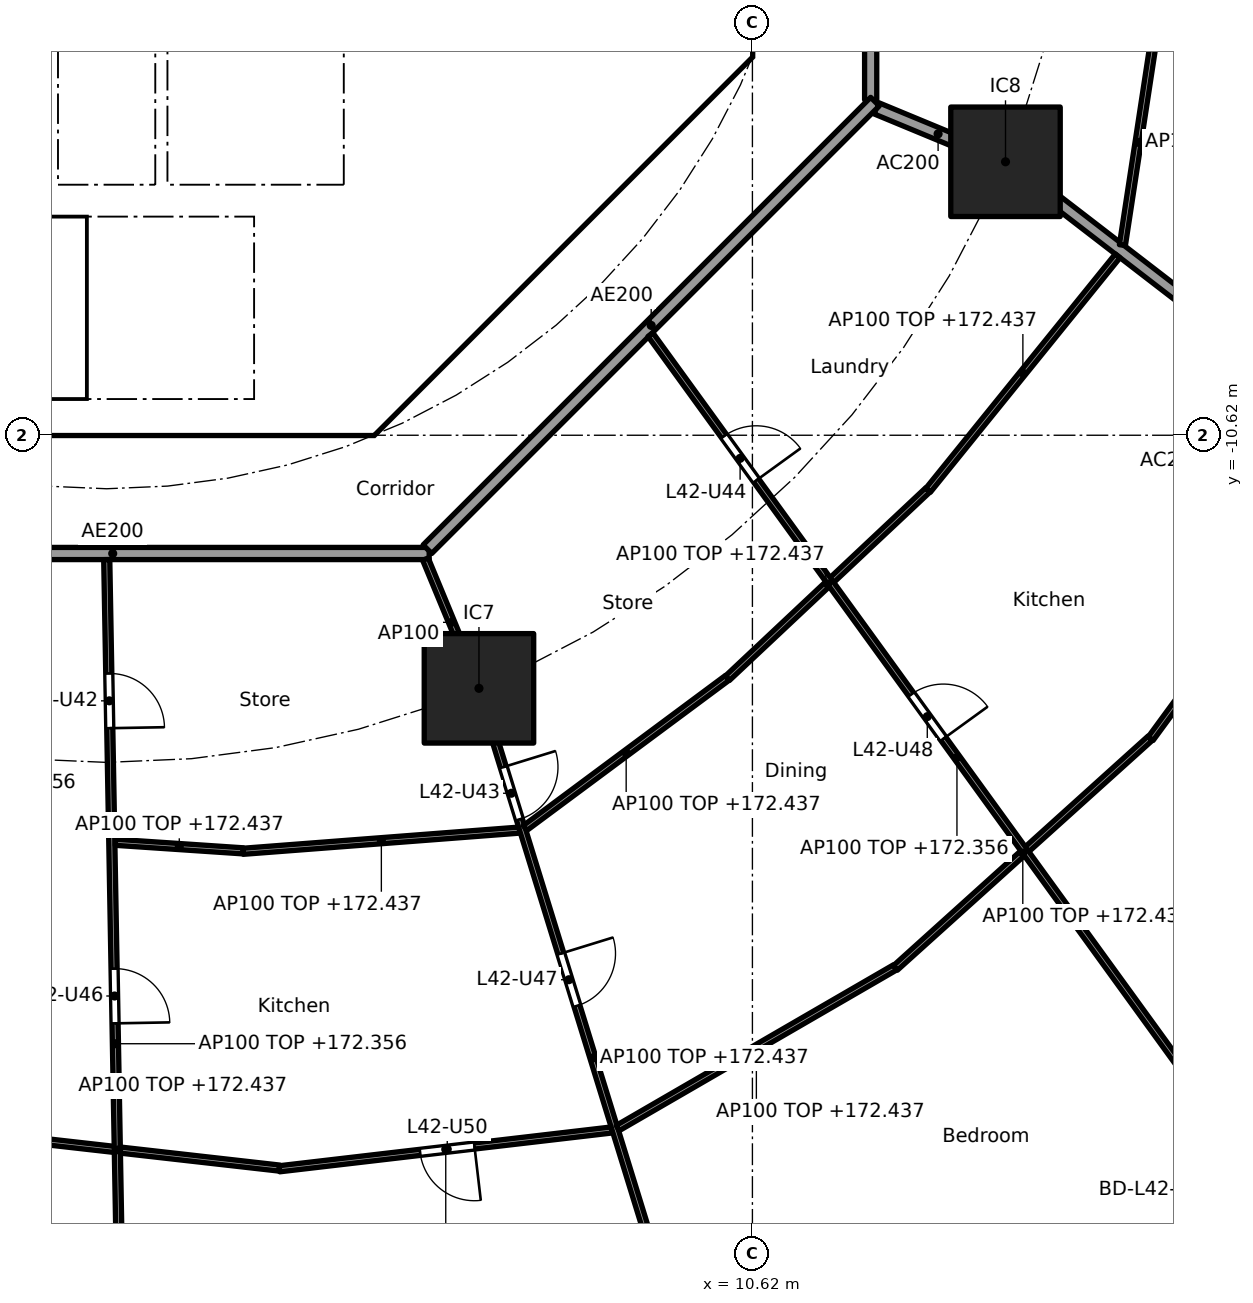
"""IFC4 building model, lengths in metres.
Left out: names, types, materials, properties, quantities, classifications, styles, units other than length and angle.
Written with IfcOpenShell. Run it as: python <this file> out.ifc"""

import sys

from ifc_helpers import new_model, si_unit, direction, frame, frame_2d, origin, origin_2d, place, context, subcontext, project, spatial, polyline, rectangle, outline, extrude, element, fill, save


model = new_model("IFC4")
c1 = context("Model", 3, precision=1e-05, world=origin(), true_north=direction((0.0, 1.0)))
c2 = subcontext(c1, "Body", "Model", "MODEL_VIEW")
j1 = project(units=[si_unit("LENGTHUNIT", "METRE"), si_unit("PLANEANGLEUNIT", "RADIAN")], contexts=[c1])
p1 = place(None, origin())
s1 = spatial("IfcSite", under=j1, at=p1, CompositionType="ELEMENT")
p2 = place(p1, origin())
s2 = spatial("IfcBuilding", under=s1, at=p2, CompositionType="ELEMENT")
p3 = place(p2, frame((0.0, 0.0, 169.6)))
s3 = spatial("IfcBuildingStorey", under=s2, at=p3, CompositionType="ELEMENT", Elevation=169.6)
for number, where, z_axis, x_axis in (
    (1, (6.123, -14.782, 0.0), (0.0, 0.0, 1.0), (1.0, 0.0, 0.0)),
    (2, (14.782, -6.123, 0.0), (0.0, 0.0, 1.0), (1.0, 0.0, 0.0)),
):
    element("IfcColumn", number, at=place(p3, frame(where, z_axis=z_axis, x_axis=x_axis)), inside=s3, PredefinedType="COLUMN", context=c2, shape_type="SweptSolid", body=[
        extrude(rectangle(XDim=1.8, YDim=1.8, at=origin_2d()), origin(), (0.0, 0.0, 1.0), 3.7),
    ])
p4 = place(p3, frame((18.972, -22.809, 0.0), z_axis=(0.0, 0.0, 1.0), x_axis=(-0.796055733703, -0.60522332146, 0.0)))
e3 = element("IfcWall", 3, at=p4, inside=s3, PredefinedType="SOLIDWALL", context=c2, shape_type="SweptSolid", body=[
    extrude(rectangle(XDim=2.917, YDim=0.25, at=frame_2d((1.458, 0.0))), origin(), (0.0, 0.0, 1.0), 3.44),
])
p5 = place(p4, frame((0.408, 0.0, 0.0)))
e4 = element("IfcOpeningElement", 4, at=p5, cuts=e3, PredefinedType="OPENING", context=c2, shape_type="SweptSolid", body=[
    extrude(rectangle(XDim=2.1, YDim=2.4, at=frame_2d((1.05, 1.2))), frame((0.0, 0.135, 0.0), z_axis=(0.0, -1.0, 0.0), x_axis=(1.0, 0.0, 0.0)), (0.0, 0.0, 1.0), 0.27),
])
p6 = place(p3, frame((4.613, -9.988, 0.0), z_axis=(0.0, 0.0, 1.0), x_axis=(0.707106781187, 0.707106781187, 0.0)))
e5 = element("IfcWall", 5, at=p6, inside=s3, PredefinedType="SHEAR", context=c2, shape_type="SweptSolid", body=[
    extrude(rectangle(XDim=7.602, YDim=0.6, at=frame_2d((3.801, 0.0))), origin(), (0.0, 0.0, 1.0), 3.44),
])
p7 = place(p6, frame((3.201, 0.0, 0.0)))
e6 = element("IfcOpeningElement", 6, at=p7, cuts=e5, PredefinedType="OPENING", context=c2, shape_type="SweptSolid", body=[
    extrude(rectangle(XDim=1.2, YDim=2.1, at=frame_2d((0.6, 1.05))), frame((0.0, 0.31, 0.0), z_axis=(0.0, -1.0, 0.0), x_axis=(1.0, 0.0, 0.0)), (0.0, 0.0, 1.0), 0.62),
])
p8 = place(p3, frame((4.0, -10.025, 0.0), z_axis=(0.0, 0.0, 1.0), x_axis=(0.0, 1.0, 0.0)))
e7 = element("IfcWall", 7, at=p8, inside=s3, PredefinedType="SOLIDWALL", context=c2, shape_type="SweptSolid", body=[
    extrude(rectangle(XDim=3.0, YDim=0.2, at=frame_2d((1.5, 0.0))), origin(), (0.0, 0.0, 1.0), 3.44),
])
p9 = place(p8, frame((0.975, 0.0, 0.0)))
e8 = element("IfcOpeningElement", 8, at=p9, cuts=e7, PredefinedType="OPENING", context=c2, shape_type="SweptSolid", body=[
    extrude(rectangle(XDim=1.1, YDim=2.1, at=frame_2d((0.55, 1.05))), frame((0.0, 0.11, 0.0), z_axis=(0.0, -1.0, 0.0), x_axis=(1.0, 0.0, 0.0)), (0.0, 0.0, 1.0), 0.22),
])
p10 = place(p3, frame((4.0, -6.5, 0.0), z_axis=(0.0, 0.0, 1.0), x_axis=(0.0, 1.0, 0.0)))
e9 = element("IfcWall", 9, at=p10, inside=s3, PredefinedType="SOLIDWALL", context=c2, shape_type="SweptSolid", body=[
    extrude(rectangle(XDim=2.2, YDim=0.2, at=frame_2d((1.1, 0.0))), origin(), (0.0, 0.0, 1.0), 3.44),
])
p11 = place(p10, frame((0.55, 0.0, 0.0)))
e10 = element("IfcOpeningElement", 10, at=p11, cuts=e9, PredefinedType="OPENING", context=c2, shape_type="SweptSolid", body=[
    extrude(rectangle(XDim=1.1, YDim=2.1, at=frame_2d((0.55, 1.05))), frame((0.0, 0.11, 0.0), z_axis=(0.0, -1.0, 0.0), x_axis=(1.0, 0.0, 0.0)), (0.0, 0.0, 1.0), 0.22),
])
p12 = place(p3, origin())
e11 = element("IfcWall", 11, at=p12, inside=s3, PredefinedType="SHEAR", context=c2, shape_type="SweptSolid", body=[
    extrude(outline(polyline([(-4.152, -10.025), (4.152, -10.025), (4.401, -9.776), (4.825, -10.2), (4.401, -10.625), (-4.401, -10.625), (-4.825, -10.2), (-4.401, -9.776), (-4.152, -10.025)])), origin(), (0.0, 0.0, 1.0), 3.44),
])
p13 = place(p3, origin())
e12 = element("IfcWall", 12, at=p13, inside=s3, PredefinedType="SHEAR", context=c2, shape_type="SweptSolid", body=[
    extrude(outline(polyline([(9.776, -4.401), (10.025, -4.152), (10.025, -3.801), (10.025, 4.152), (9.776, 4.401), (10.2, 4.825), (10.625, 4.401), (10.625, -4.401), (10.2, -4.825), (9.776, -4.401)])), origin(), (0.0, 0.0, 1.0), 3.44),
])
for number, where, z_axis, x_axis in (
    (13, (-0.9, -6.5, 0.0), (0.0, 0.0, 1.0), (0.0, 1.0, 0.0)),
    (14, (0.9, -6.5, 0.0), (0.0, 0.0, 1.0), (0.0, 1.0, 0.0)),
):
    element("IfcWall", number, at=place(p3, frame(where, z_axis=z_axis, x_axis=x_axis)), inside=s3, PredefinedType="SOLIDWALL", context=c2, shape_type="SweptSolid", body=[
        extrude(rectangle(XDim=2.2, YDim=0.2, at=frame_2d((1.1, 0.0))), origin(), (0.0, 0.0, 1.0), 3.44),
    ])
p14 = place(p3, origin())
e15 = element("IfcWall", 15, at=p14, inside=s3, PredefinedType="SOLIDWALL", context=c2, shape_type="SweptSolid", body=[
    extrude(outline(polyline([(4.1, -7.025), (-4.1, -7.025), (-4.1, -6.5), (4.1, -6.5), (4.1, -7.025)])), origin(), (0.0, 0.0, 1.0), 3.44),
])
p15 = place(p3, frame((12.657, -5.243, 0.0), z_axis=(0.0, 0.0, 1.0), x_axis=(0.92383017907, -0.382802560388, 0.0)))
e16 = element("IfcWall", 16, at=p15, inside=s3, PredefinedType="PARTITIONING", context=c2, shape_type="SweptSolid", body=[
    extrude(rectangle(XDim=2.2, YDim=0.2, at=frame_2d((1.1, 0.0))), origin(), (0.0, 0.0, 1.0), 3.44),
])
p16 = place(p3, frame((14.822, -6.154, 0.0), z_axis=(0.0, 0.0, 1.0), x_axis=(0.792203056092, -0.610257583254, 0.0)))
e17 = element("IfcWall", 17, at=p16, inside=s3, PredefinedType="PARTITIONING", context=c2, shape_type="SweptSolid", body=[
    extrude(rectangle(XDim=12.533, YDim=0.2, at=frame_2d((6.266, 0.0))), origin(), (0.0, 0.0, 1.0), 2.837),
])
p17 = place(p3, frame((12.565, -5.104, 0.0), z_axis=(0.0, 0.0, 1.0), x_axis=(0.0, 1.0, 0.0)))
e18 = element("IfcWall", 18, at=p17, inside=s3, PredefinedType="PARTITIONING", context=c2, shape_type="SweptSolid", body=[
    extrude(rectangle(XDim=10.209, YDim=0.2, at=frame_2d((5.104, 0.0))), origin(), (0.0, 0.0, 1.0), 3.44),
])
p18 = place(p17, frame((5.906, 0.0, 0.0)))
e19 = element("IfcOpeningElement", 19, at=p18, cuts=e18, PredefinedType="OPENING", context=c2, shape_type="SweptSolid", body=[
    extrude(rectangle(XDim=1.0, YDim=2.1, at=frame_2d((0.5, 1.05))), frame((0.0, 0.11, 0.0), z_axis=(0.0, -1.0, 0.0), x_axis=(1.0, 0.0, 0.0)), (0.0, 0.0, 1.0), 0.22),
])
p19 = place(p3, frame((-5.104, -12.565, 0.0), z_axis=(0.0, 0.0, 1.0), x_axis=(1.0, 0.0, 0.0)))
e20 = element("IfcWall", 20, at=p19, inside=s3, PredefinedType="PARTITIONING", context=c2, shape_type="SweptSolid", body=[
    extrude(rectangle(XDim=10.409, YDim=0.2, at=frame_2d((5.205, 0.0))), origin(), (0.0, 0.0, 1.0), 3.44),
])
p20 = place(p19, frame((2.87, 0.0, 0.0)))
e21 = element("IfcOpeningElement", 21, at=p20, cuts=e20, PredefinedType="OPENING", context=c2, shape_type="SweptSolid", body=[
    extrude(rectangle(XDim=1.0, YDim=2.1, at=frame_2d((0.5, 1.05))), frame((0.0, 0.11, 0.0), z_axis=(0.0, -1.0, 0.0), x_axis=(1.0, 0.0, 0.0)), (0.0, 0.0, 1.0), 0.22),
])
p21 = place(p3, frame((5.275, -12.494, 0.0), z_axis=(0.0, 0.0, 1.0), x_axis=(0.707106781187, 0.707106781187, 0.0)))
e22 = element("IfcWall", 22, at=p21, inside=s3, PredefinedType="PARTITIONING", context=c2, shape_type="SweptSolid", body=[
    extrude(rectangle(XDim=10.409, YDim=0.2, at=frame_2d((5.205, 0.0))), origin(), (0.0, 0.0, 1.0), 3.44),
])
p22 = place(p3, frame((-2.449, -22.073, 0.0), z_axis=(0.0, 0.0, 1.0), x_axis=(0.993660315081, -0.112424099879, 0.0)))
e23 = element("IfcWall", 23, at=p22, inside=s3, PredefinedType="PARTITIONING", context=c2, shape_type="SweptSolid", body=[
    extrude(rectangle(XDim=5.325, YDim=0.1, at=frame_2d((2.662, 0.0))), origin(), (0.0, 0.0, 1.0), 2.837),
])
p23 = place(p3, frame((0.002, -12.665, 0.0), z_axis=(0.0, 0.0, 1.0), x_axis=(0.01792079652, -0.999839409631, 0.0)))
e24 = element("IfcWall", 24, at=p23, inside=s3, PredefinedType="PARTITIONING", context=c2, shape_type="SweptSolid", body=[
    extrude(rectangle(XDim=15.926, YDim=0.1, at=frame_2d((7.963, 0.0))), origin(), (0.0, 0.0, 1.0), 2.756),
])
p24 = place(p23, frame((1.873, 0.0, 0.0)))
e25 = element("IfcOpeningElement", 25, at=p24, cuts=e24, PredefinedType="OPENING", context=c2, shape_type="SweptSolid", body=[
    extrude(rectangle(XDim=0.9, YDim=2.1, at=frame_2d((0.45, 1.05))), frame((0.0, 0.06, 0.0), z_axis=(0.0, -1.0, 0.0), x_axis=(1.0, 0.0, 0.0)), (0.0, 0.0, 1.0), 0.12),
])
p25 = place(p23, frame((6.728, 0.0, 0.0)))
e26 = element("IfcOpeningElement", 26, at=p25, cuts=e24, PredefinedType="OPENING", context=c2, shape_type="SweptSolid", body=[
    extrude(rectangle(XDim=0.9, YDim=2.1, at=frame_2d((0.45, 1.05))), frame((0.0, 0.06, 0.0), z_axis=(0.0, -1.0, 0.0), x_axis=(1.0, 0.0, 0.0)), (0.0, 0.0, 1.0), 0.12),
])
p26 = place(p3, frame((0.145, -17.314, 0.0), z_axis=(0.0, 0.0, 1.0), x_axis=(0.997756833447, -0.06694252243, 0.0)))
e27 = element("IfcWall", 27, at=p26, inside=s3, PredefinedType="PARTITIONING", context=c2, shape_type="SweptSolid", body=[
    extrude(rectangle(XDim=2.104, YDim=0.1, at=frame_2d((1.052, 0.0))), origin(), (0.0, 0.0, 1.0), 2.837),
])
p27 = place(p3, frame((2.245, -17.462, 0.0), z_axis=(0.0, 0.0, 1.0), x_axis=(0.997077117727, 0.07640171009, 0.0)))
e28 = element("IfcWall", 28, at=p27, inside=s3, PredefinedType="PARTITIONING", context=c2, shape_type="SweptSolid", body=[
    extrude(rectangle(XDim=4.56, YDim=0.1, at=frame_2d((2.28, 0.0))), origin(), (0.0, 0.0, 1.0), 2.837),
])
p28 = place(p3, frame((2.842, -22.683, 0.0), z_axis=(0.0, 0.0, 1.0), x_axis=(0.993248590259, 0.116005335864, 0.0)))
e29 = element("IfcWall", 29, at=p28, inside=s3, PredefinedType="PARTITIONING", context=c2, shape_type="SweptSolid", body=[
    extrude(rectangle(XDim=5.508, YDim=0.1, at=frame_2d((2.754, 0.0))), origin(), (0.0, 0.0, 1.0), 2.837),
])
p29 = place(p28, frame((2.329, 0.0, 0.0)))
e30 = element("IfcOpeningElement", 30, at=p29, cuts=e29, PredefinedType="OPENING", context=c2, shape_type="SweptSolid", body=[
    extrude(rectangle(XDim=0.9, YDim=2.1, at=frame_2d((0.45, 1.05))), frame((0.0, 0.06, 0.0), z_axis=(0.0, -1.0, 0.0), x_axis=(1.0, 0.0, 0.0)), (0.0, 0.0, 1.0), 0.12),
])
p30 = place(p3, frame((5.243, -12.657, 0.0), z_axis=(0.0, 0.0, 1.0), x_axis=(0.382719158442, -0.923864733477, 0.0)))
e31 = element("IfcWall", 31, at=p30, inside=s3, PredefinedType="PARTITIONING", context=c2, shape_type="SweptSolid", body=[
    extrude(rectangle(XDim=2.25, YDim=0.1, at=frame_2d((1.125, 0.0))), origin(), (0.0, 0.0, 1.0), 3.44),
])
p31 = place(p3, frame((6.138, -14.83, 0.0), z_axis=(0.0, 0.0, 1.0), x_axis=(0.294818517221, -0.955553264818, 0.0)))
e32 = element("IfcWall", 32, at=p31, inside=s3, PredefinedType="PARTITIONING", context=c2, shape_type="SweptSolid", body=[
    extrude(rectangle(XDim=12.619, YDim=0.1, at=frame_2d((6.31, 0.0))), origin(), (0.0, 0.0, 1.0), 2.837),
])
p32 = place(p31, frame((1.306, 0.0, 0.0)))
e33 = element("IfcOpeningElement", 33, at=p32, cuts=e32, PredefinedType="OPENING", context=c2, shape_type="SweptSolid", body=[
    extrude(rectangle(XDim=0.9, YDim=2.1, at=frame_2d((0.45, 1.05))), frame((0.0, 0.06, 0.0), z_axis=(0.0, -1.0, 0.0), x_axis=(1.0, 0.0, 0.0)), (0.0, 0.0, 1.0), 0.12),
])
p33 = place(p31, frame((4.515, 0.0, 0.0)))
e34 = element("IfcOpeningElement", 34, at=p33, cuts=e32, PredefinedType="OPENING", context=c2, shape_type="SweptSolid", body=[
    extrude(rectangle(XDim=0.9, YDim=2.1, at=frame_2d((0.45, 1.05))), frame((0.0, 0.06, 0.0), z_axis=(0.0, -1.0, 0.0), x_axis=(1.0, 0.0, 0.0)), (0.0, 0.0, 1.0), 0.12),
])
p34 = place(p31, frame((9.632, 0.0, 0.0)))
e35 = element("IfcOpeningElement", 35, at=p34, cuts=e32, PredefinedType="OPENING", context=c2, shape_type="SweptSolid", body=[
    extrude(rectangle(XDim=0.9, YDim=2.1, at=frame_2d((0.45, 1.05))), frame((0.0, 0.06, 0.0), z_axis=(0.0, -1.0, 0.0), x_axis=(1.0, 0.0, 0.0)), (0.0, 0.0, 1.0), 0.12),
])
p35 = place(p3, frame((6.881, -17.08, 0.0), z_axis=(0.0, 0.0, 1.0), x_axis=(0.802784956441, 0.596268659005, 0.0)))
e36 = element("IfcWall", 36, at=p35, inside=s3, PredefinedType="PARTITIONING", context=c2, shape_type="SweptSolid", body=[
    extrude(rectangle(XDim=4.142, YDim=0.1, at=frame_2d((2.071, 0.0))), origin(), (0.0, 0.0, 1.0), 2.837),
])
p36 = place(p3, frame((8.405, -22.013, 0.0), z_axis=(0.0, 0.0, 1.0), x_axis=(0.865277177388, 0.501293732547, 0.0)))
e37 = element("IfcWall", 37, at=p36, inside=s3, PredefinedType="PARTITIONING", context=c2, shape_type="SweptSolid", body=[
    extrude(rectangle(XDim=5.27, YDim=0.1, at=frame_2d((2.635, 0.0))), origin(), (0.0, 0.0, 1.0), 2.837),
])
p37 = place(p3, frame((10.21, -14.614, 0.0), z_axis=(0.0, 0.0, 1.0), x_axis=(0.728883199496, 0.684638066055, 0.0)))
e38 = element("IfcWall", 38, at=p37, inside=s3, PredefinedType="PARTITIONING", context=c2, shape_type="SweptSolid", body=[
    extrude(rectangle(XDim=4.519, YDim=0.1, at=frame_2d((2.26, 0.0))), origin(), (0.0, 0.0, 1.0), 2.837),
])
p38 = place(p3, frame((12.971, -19.38, 0.0), z_axis=(0.0, 0.0, 1.0), x_axis=(0.742768881471, 0.669547898748, 0.0)))
e39 = element("IfcWall", 39, at=p38, inside=s3, PredefinedType="PARTITIONING", context=c2, shape_type="SweptSolid", body=[
    extrude(rectangle(XDim=5.642, YDim=0.1, at=frame_2d((2.821, 0.0))), origin(), (0.0, 0.0, 1.0), 2.837),
])
p39 = place(p3, frame((8.943, -8.966, 0.0), z_axis=(0.0, 0.0, 1.0), x_axis=(0.586803608919, -0.809729290912, 0.0)))
e40 = element("IfcWall", 40, at=p39, inside=s3, PredefinedType="PARTITIONING", context=c2, shape_type="SweptSolid", body=[
    extrude(rectangle(XDim=17.179, YDim=0.1, at=frame_2d((8.589, 0.0))), origin(), (0.0, 0.0, 1.0), 2.756),
])
p40 = place(p39, frame((2.062, 0.0, 0.0)))
e41 = element("IfcOpeningElement", 41, at=p40, cuts=e40, PredefinedType="OPENING", context=c2, shape_type="SweptSolid", body=[
    extrude(rectangle(XDim=0.9, YDim=2.1, at=frame_2d((0.45, 1.05))), frame((0.0, 0.06, 0.0), z_axis=(0.0, -1.0, 0.0), x_axis=(1.0, 0.0, 0.0)), (0.0, 0.0, 1.0), 0.12),
])
p41 = place(p39, frame((7.308, 0.0, 0.0)))
e42 = element("IfcOpeningElement", 42, at=p41, cuts=e40, PredefinedType="OPENING", context=c2, shape_type="SweptSolid", body=[
    extrude(rectangle(XDim=0.9, YDim=2.1, at=frame_2d((0.45, 1.05))), frame((0.0, 0.06, 0.0), z_axis=(0.0, -1.0, 0.0), x_axis=(1.0, 0.0, 0.0)), (0.0, 0.0, 1.0), 0.12),
])
p42 = place(p3, frame((13.509, -11.525, 0.0), z_axis=(0.0, 0.0, 1.0), x_axis=(0.628764602857, 0.777595700987, 0.0)))
e43 = element("IfcWall", 43, at=p42, inside=s3, PredefinedType="PARTITIONING", context=c2, shape_type="SweptSolid", body=[
    extrude(rectangle(XDim=4.957, YDim=0.1, at=frame_2d((2.479, 0.0))), origin(), (0.0, 0.0, 1.0), 2.837),
])
p43 = place(p3, frame((17.169, -15.609, 0.0), z_axis=(0.0, 0.0, 1.0), x_axis=(0.591122127251, 0.806582066918, 0.0)))
e44 = element("IfcWall", 44, at=p43, inside=s3, PredefinedType="PARTITIONING", context=c2, shape_type="SweptSolid", body=[
    extrude(rectangle(XDim=5.96, YDim=0.1, at=frame_2d((2.98, 0.0))), origin(), (0.0, 0.0, 1.0), 2.837),
])
p44 = place(p43, frame((2.555, 0.0, 0.0)))
e45 = element("IfcOpeningElement", 45, at=p44, cuts=e44, PredefinedType="OPENING", context=c2, shape_type="SweptSolid", body=[
    extrude(rectangle(XDim=0.9, YDim=2.1, at=frame_2d((0.45, 1.05))), frame((0.0, 0.06, 0.0), z_axis=(0.0, -1.0, 0.0), x_axis=(1.0, 0.0, 0.0)), (0.0, 0.0, 1.0), 0.12),
])
p45 = place(p3, frame((16.704, -7.493, 0.0), z_axis=(0.0, 0.0, 1.0), x_axis=(0.1510806336, 0.988521442434, 0.0)))
e46 = element("IfcWall", 46, at=p45, inside=s3, PredefinedType="PARTITIONING", context=c2, shape_type="SweptSolid", body=[
    extrude(rectangle(XDim=3.419, YDim=0.1, at=frame_2d((1.71, 0.0))), origin(), (0.0, 0.0, 1.0), 2.837),
])
p46 = place(p5, origin())
e47 = element("IfcDoor", 47, at=p46, inside=s3, OperationType="SLIDING_TO_LEFT", PredefinedType="DOOR", context=c2, shape_type="SweptSolid", body=[
    extrude(rectangle(XDim=2.1, YDim=2.4, at=frame_2d((1.05, 1.2))), frame((0.0, 0.025, 0.0), z_axis=(0.0, -1.0, 0.0), x_axis=(1.0, 0.0, 0.0)), (0.0, 0.0, 1.0), 0.05),
])
fill(e4, e47)
p47 = place(p11, origin())
e48 = element("IfcDoor", 48, at=p47, inside=s3, OperationType="DOUBLE_DOOR_SLIDING", PredefinedType="DOOR", context=c2, shape_type="SweptSolid", body=[
    extrude(rectangle(XDim=1.1, YDim=2.1, at=frame_2d((0.55, 1.05))), frame((0.0, 0.025, 0.0), z_axis=(0.0, -1.0, 0.0), x_axis=(1.0, 0.0, 0.0)), (0.0, 0.0, 1.0), 0.05),
])
fill(e10, e48)
p48 = place(p9, origin())
e49 = element("IfcDoor", 49, at=p48, inside=s3, OperationType="SINGLE_SWING_RIGHT", PredefinedType="DOOR", context=c2, shape_type="SweptSolid", body=[
    extrude(rectangle(XDim=1.1, YDim=2.1, at=frame_2d((0.55, 1.05))), frame((0.0, 0.025, 0.0), z_axis=(0.0, -1.0, 0.0), x_axis=(1.0, 0.0, 0.0)), (0.0, 0.0, 1.0), 0.05),
])
fill(e8, e49)
p49 = place(p7, origin())
e50 = element("IfcDoor", 50, at=p49, inside=s3, OperationType="SINGLE_SWING_RIGHT", PredefinedType="DOOR", context=c2, shape_type="SweptSolid", body=[
    extrude(rectangle(XDim=1.2, YDim=2.1, at=frame_2d((0.6, 1.05))), frame((0.0, 0.025, 0.0), z_axis=(0.0, -1.0, 0.0), x_axis=(1.0, 0.0, 0.0)), (0.0, 0.0, 1.0), 0.05),
])
fill(e6, e50)
p50 = place(p24, origin())
e51 = element("IfcDoor", 51, at=p50, inside=s3, OperationType="SINGLE_SWING_RIGHT", PredefinedType="DOOR", context=c2, shape_type="SweptSolid", body=[
    extrude(rectangle(XDim=0.9, YDim=2.1, at=frame_2d((0.45, 1.05))), frame((0.0, 0.025, 0.0), z_axis=(0.0, -1.0, 0.0), x_axis=(1.0, 0.0, 0.0)), (0.0, 0.0, 1.0), 0.05),
])
fill(e25, e51)
p51 = place(p32, origin())
e52 = element("IfcDoor", 52, at=p51, inside=s3, OperationType="SINGLE_SWING_LEFT", PredefinedType="DOOR", context=c2, shape_type="SweptSolid", body=[
    extrude(rectangle(XDim=0.9, YDim=2.1, at=frame_2d((0.45, 1.05))), frame((0.0, 0.025, 0.0), z_axis=(0.0, -1.0, 0.0), x_axis=(1.0, 0.0, 0.0)), (0.0, 0.0, 1.0), 0.05),
])
fill(e33, e52)
p52 = place(p40, origin())
e53 = element("IfcDoor", 53, at=p52, inside=s3, OperationType="SINGLE_SWING_RIGHT", PredefinedType="DOOR", context=c2, shape_type="SweptSolid", body=[
    extrude(rectangle(XDim=0.9, YDim=2.1, at=frame_2d((0.45, 1.05))), frame((0.0, 0.025, 0.0), z_axis=(0.0, -1.0, 0.0), x_axis=(1.0, 0.0, 0.0)), (0.0, 0.0, 1.0), 0.05),
])
fill(e41, e53)
p53 = place(p25, origin())
e54 = element("IfcDoor", 54, at=p53, inside=s3, OperationType="SINGLE_SWING_RIGHT", PredefinedType="DOOR", context=c2, shape_type="SweptSolid", body=[
    extrude(rectangle(XDim=0.9, YDim=2.1, at=frame_2d((0.45, 1.05))), frame((0.0, 0.025, 0.0), z_axis=(0.0, -1.0, 0.0), x_axis=(1.0, 0.0, 0.0)), (0.0, 0.0, 1.0), 0.05),
])
fill(e26, e54)
p54 = place(p33, origin())
e55 = element("IfcDoor", 55, at=p54, inside=s3, OperationType="SINGLE_SWING_LEFT", PredefinedType="DOOR", context=c2, shape_type="SweptSolid", body=[
    extrude(rectangle(XDim=0.9, YDim=2.1, at=frame_2d((0.45, 1.05))), frame((0.0, 0.025, 0.0), z_axis=(0.0, -1.0, 0.0), x_axis=(1.0, 0.0, 0.0)), (0.0, 0.0, 1.0), 0.05),
])
fill(e34, e55)
p55 = place(p41, origin())
e56 = element("IfcDoor", 56, at=p55, inside=s3, OperationType="SINGLE_SWING_RIGHT", PredefinedType="DOOR", context=c2, shape_type="SweptSolid", body=[
    extrude(rectangle(XDim=0.9, YDim=2.1, at=frame_2d((0.45, 1.05))), frame((0.0, 0.025, 0.0), z_axis=(0.0, -1.0, 0.0), x_axis=(1.0, 0.0, 0.0)), (0.0, 0.0, 1.0), 0.05),
])
fill(e42, e56)
p56 = place(p29, frame((0.9, 0.0, 0.0), x_axis=(-1.0, 0.0, 0.0)))
e57 = element("IfcDoor", 57, at=p56, inside=s3, OperationType="SINGLE_SWING_LEFT", PredefinedType="DOOR", context=c2, shape_type="SweptSolid", body=[
    extrude(rectangle(XDim=0.9, YDim=2.1, at=frame_2d((0.45, 1.05))), frame((0.0, 0.025, 0.0), z_axis=(0.0, -1.0, 0.0), x_axis=(1.0, 0.0, 0.0)), (0.0, 0.0, 1.0), 0.05),
])
fill(e30, e57)
save(model, sys.argv[1])
